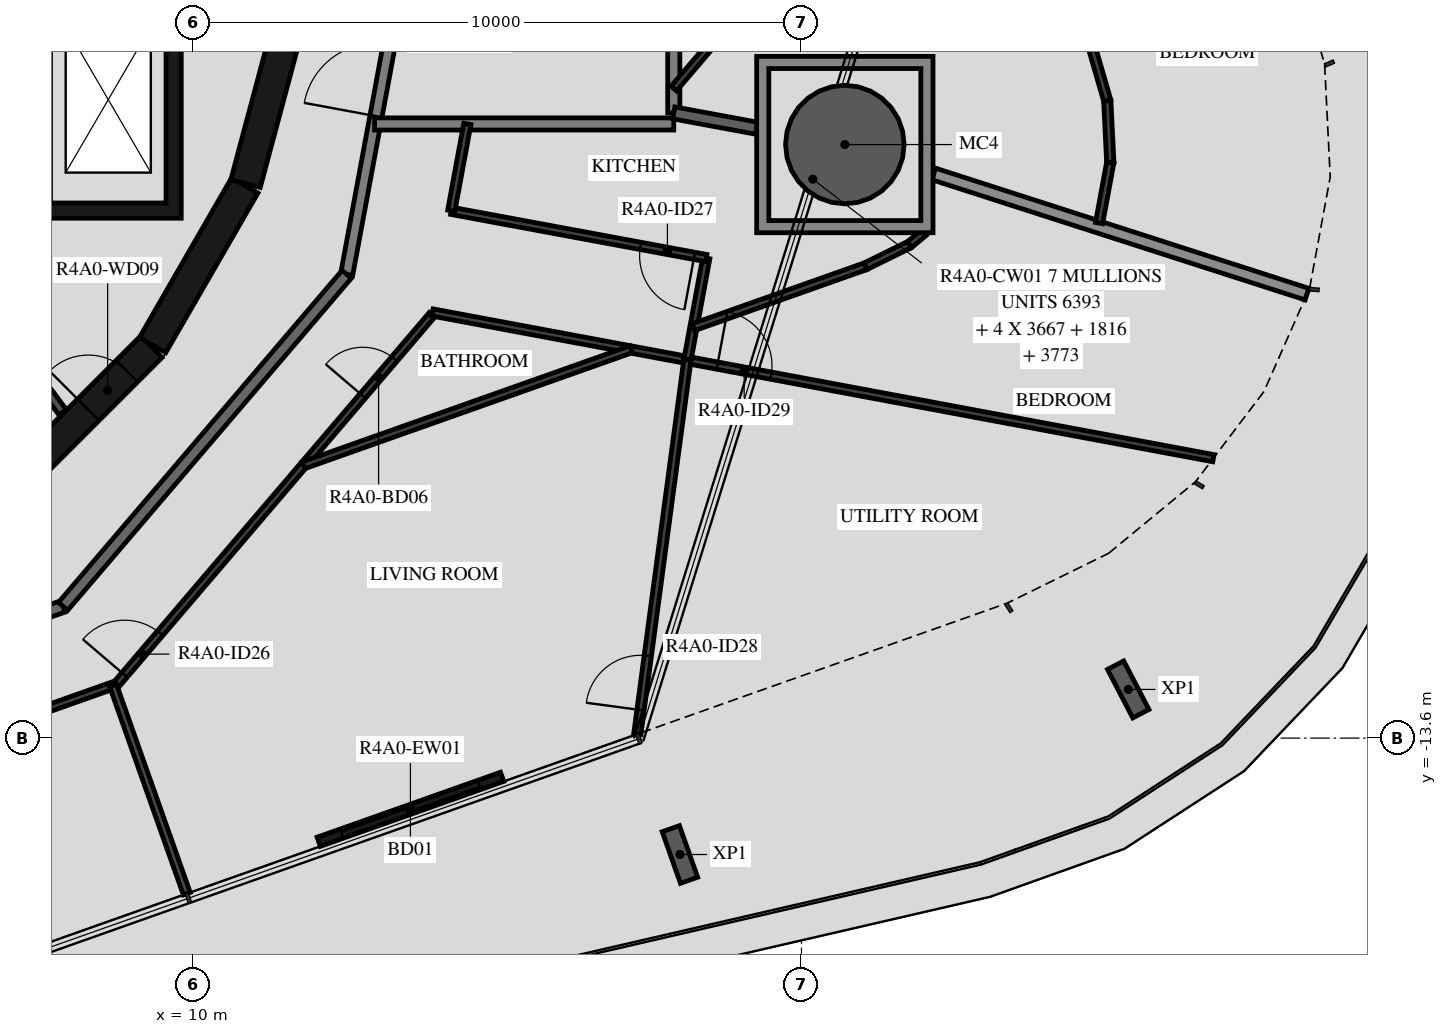
"""IFC4 building model, lengths in metres.
Left out: names, types, materials, properties, quantities, classifications, styles, units other than length and angle.
Written with IfcOpenShell. Run it as: python <this file> out.ifc"""

import sys

from ifc_helpers import new_model, si_unit, direction, frame, frame_2d, origin, origin_2d, place, context, subcontext, project, spatial, polyline, rectangle, hollow_circle, i_section, outline, extrude, element, fill, save


model = new_model("IFC4")
c1 = context("Model", 3, precision=1e-05, world=origin(), true_north=direction((0.0, 1.0)))
c2 = subcontext(c1, "Body", "Model", "MODEL_VIEW")
j1 = project(units=[si_unit("LENGTHUNIT", "METRE"), si_unit("PLANEANGLEUNIT", "RADIAN")], contexts=[c1])
p1 = place(None, origin())
s1 = spatial("IfcSite", under=j1, at=p1, CompositionType="ELEMENT")
p2 = place(p1, origin())
s2 = spatial("IfcBuilding", under=s1, at=p2, CompositionType="ELEMENT")
p3 = place(p2, frame((0.0, 0.0, 151.7)))
s3 = spatial("IfcBuildingStorey", under=s2, at=p3, CompositionType="ELEMENT", Elevation=151.7)
p4 = place(p3, frame((20.713, -3.839, -0.45), z_axis=(0.0, 0.0, 1.0), x_axis=(1.0, 0.0, 0.0)))
e1 = element("IfcColumn", 1, at=p4, inside=s3, PredefinedType="COLUMN", context=c2, shape_type="SweptSolid", body=[
    extrude(hollow_circle(Radius=0.975, WallThickness=0.045, at=origin_2d()), origin(), (0.0, 0.0, 1.0), 3.57),
])
for number, where, z_axis, x_axis in (
    (2, (18.001, -15.514, -0.45), (0.0, 0.0, 1.0), (-0.943, -0.334, 0.0)),
    (3, (25.374, -12.799, -0.45), (0.0, 0.0, 1.0), (-0.887, -0.461, 0.0)),
):
    element("IfcColumn", number, at=place(p3, frame(where, z_axis=z_axis, x_axis=x_axis)), inside=s3, PredefinedType="COLUMN", context=c2, shape_type="SweptSolid", body=[
        extrude(i_section(OverallWidth=0.3, OverallDepth=0.9, WebThickness=0.019, FlangeThickness=0.035, FilletRadius=0.03, at=origin_2d()), origin(), (0.0, 0.0, 1.0), 3.57),
    ])
p5 = place(p3, frame((12.061, -15.305, 0.0), z_axis=(0.0, 0.0, 1.0), x_axis=(0.942620722428, 0.333865502335, 0.0)))
e4 = element("IfcWall", 4, at=p5, inside=s3, PredefinedType="STANDARD", context=c2, shape_type="SweptSolid", body=[
    extrude(rectangle(XDim=3.2, YDim=0.16, at=frame_2d((1.6, 0.0))), origin(), (0.0, 0.0, 1.0), 3.12),
])
p6 = place(p5, frame((0.4, 0.0, 0.0)))
e5 = element("IfcOpeningElement", 5, at=p6, cuts=e4, PredefinedType="OPENING", context=c2, shape_type="SweptSolid", body=[
    extrude(rectangle(XDim=2.4, YDim=2.4, at=frame_2d((1.2, 1.2))), frame((0.0, 0.09, 0.0), z_axis=(0.0, -1.0, 0.0), x_axis=(1.0, 0.0, 0.0)), (0.0, 0.0, 1.0), 0.18),
])
p7 = place(p3, frame((7.164, -9.308, 0.0), z_axis=(0.0, 0.0, 1.0), x_axis=(0.707106781187, 0.707106781187, 0.0)))
e6 = element("IfcWall", 6, at=p7, inside=s3, PredefinedType="SHEAR", context=c2, shape_type="SweptSolid", body=[
    extrude(rectangle(XDim=3.032, YDim=0.5, at=frame_2d((1.516, 0.0))), origin(), (0.0, 0.0, 1.0), 3.12),
])
p8 = place(p7, frame((1.566, 0.0, 0.0)))
e7 = element("IfcOpeningElement", 7, at=p8, cuts=e6, PredefinedType="OPENING", context=c2, shape_type="SweptSolid", body=[
    extrude(rectangle(XDim=0.9, YDim=2.1, at=frame_2d((0.45, 1.05))), frame((0.0, 0.26, 0.0), z_axis=(0.0, -1.0, 0.0), x_axis=(1.0, 0.0, 0.0)), (0.0, 0.0, 1.0), 0.52),
])
for number, where, z_axis, x_axis in (
    (8, (9.329, -7.137, 0.0), (0.0, 0.0, 1.0), (0.5, 0.866, 0.0)),
    (9, (10.858, -4.479, 0.0), (0.0, 0.0, 1.0), (0.259, 0.966, 0.0)),
):
    element("IfcWall", number, at=place(p3, frame(where, z_axis=z_axis, x_axis=x_axis)), inside=s3, PredefinedType="SHEAR", context=c2, shape_type="SweptSolid", body=[
        extrude(rectangle(XDim=3.033, YDim=0.5, at=frame_2d((1.516, 0.0))), origin(), (0.0, 0.0, 1.0), 3.12),
    ])
p9 = place(p3, origin())
e10 = element("IfcWall", 10, at=p9, inside=s3, PredefinedType="SHEAR", context=c2, shape_type="SweptSolid", body=[
    extrude(outline(polyline([(9.8, -5.05), (9.8, -4.8), (9.8, -1.9), (9.55, -1.9), (9.55, -4.8), (7.65, -4.8), (7.65, -1.9), (7.4, -1.9), (7.4, -4.8), (5.5, -4.8), (5.5, -1.9), (5.25, -1.9), (5.25, -4.8), (3.35, -4.8), (3.35, -1.9), (3.1, -1.9), (3.1, -4.8), (1.2, -4.8), (1.2, -1.9), (0.95, -1.9), (0.95, -4.8), (-0.95, -4.8), (-0.95, -1.9), (-1.2, -1.9), (-1.2, -4.8), (-3.1, -4.8), (-3.1, -1.9), (-3.35, -1.9), (-3.35, -4.8), (-5.25, -4.8), (-5.25, -1.9), (-5.5, -1.9), (-5.5, -4.8), (-7.4, -4.8), (-7.4, -1.9), (-7.65, -1.9), (-7.65, -4.8), (-9.55, -4.8), (-9.55, -1.9), (-9.8, -1.9), (-9.8, -4.8), (-9.8, -5.05), (9.8, -5.05)])), origin(), (0.0, 0.0, 1.0), 3.12),
])
p10 = place(p3, frame((5.528, -5.098, 0.0), z_axis=(0.0, 0.0, 1.0), x_axis=(0.594034318069, -0.804439698769, 0.0)))
e11 = element("IfcWall", 11, at=p10, inside=s3, PredefinedType="PARTITIONING", context=c2, shape_type="SweptSolid", body=[
    extrude(rectangle(XDim=3.907, YDim=0.15, at=frame_2d((1.953, 0.0))), origin(), (0.0, 0.0, 1.0), 3.12),
])
p11 = place(p3, frame((12.521, -5.972, 0.0), z_axis=(0.0, 0.0, 1.0), x_axis=(0.182244189886, 0.983253301674, 0.0)))
e12 = element("IfcWall", 12, at=p11, inside=s3, PredefinedType="STANDARD", context=c2, shape_type="SweptSolid", body=[
    extrude(rectangle(XDim=4.176, YDim=0.2, at=frame_2d((2.088, 0.0))), origin(), (0.0, 0.0, 1.0), 3.12),
])
p12 = place(p11, frame((2.645, 0.0, 0.0)))
e13 = element("IfcOpeningElement", 13, at=p12, cuts=e12, PredefinedType="OPENING", context=c2, shape_type="SweptSolid", body=[
    extrude(rectangle(XDim=1.2, YDim=2.1, at=frame_2d((0.6, 1.05))), frame((0.0, 0.11, 0.0), z_axis=(0.0, -1.0, 0.0), x_axis=(1.0, 0.0, 0.0)), (0.0, 0.0, 1.0), 0.22),
])
p13 = place(p3, frame((1.088, -13.83, 0.0), z_axis=(0.0, 0.0, 1.0), x_axis=(0.942648397945, 0.333787354241, 0.0)))
e14 = element("IfcWall", 14, at=p13, inside=s3, PredefinedType="STANDARD", context=c2, shape_type="SweptSolid", body=[
    extrude(rectangle(XDim=7.181, YDim=0.2, at=frame_2d((3.591, 0.0))), origin(), (0.0, 0.0, 1.0), 3.12),
])
p14 = place(p13, frame((0.2, 0.0, 0.0)))
e15 = element("IfcOpeningElement", 15, at=p14, cuts=e14, PredefinedType="OPENING", context=c2, shape_type="SweptSolid", body=[
    extrude(rectangle(XDim=1.0, YDim=2.1, at=frame_2d((0.5, 1.05))), frame((0.0, 0.11, 0.0), z_axis=(0.0, -1.0, 0.0), x_axis=(1.0, 0.0, 0.0)), (0.0, 0.0, 1.0), 0.22),
])
p15 = place(p3, frame((7.858, -11.433, 0.0), z_axis=(0.0, 0.0, 1.0), x_axis=(0.649440801937, 0.760412154545, 0.0)))
e16 = element("IfcWall", 16, at=p15, inside=s3, PredefinedType="STANDARD", context=c2, shape_type="SweptSolid", body=[
    extrude(rectangle(XDim=7.181, YDim=0.2, at=frame_2d((3.59, 0.0))), origin(), (0.0, 0.0, 1.0), 3.12),
])
p16 = place(p3, frame((17.9, -3.318, 0.0), z_axis=(0.0, 0.0, 1.0), x_axis=(0.0, 1.0, 0.0)))
e17 = element("IfcWall", 17, at=p16, inside=s3, PredefinedType="STANDARD", context=c2, shape_type="SweptSolid", body=[
    extrude(rectangle(XDim=6.818, YDim=0.2, at=frame_2d((3.409, 0.0))), origin(), (0.0, 0.0, 1.0), 3.12),
])
p17 = place(p3, frame((12.979, -3.5, 0.0), z_axis=(0.0, 0.0, 1.0), x_axis=(1.0, 0.0, 0.0)))
e18 = element("IfcWall", 18, at=p17, inside=s3, PredefinedType="STANDARD", context=c2, shape_type="SweptSolid", body=[
    extrude(rectangle(XDim=4.92, YDim=0.2, at=frame_2d((2.46, 0.0))), origin(), (0.0, 0.0, 1.0), 3.12),
])
p18 = place(p3, frame((22.173, -4.322, 0.0), z_axis=(0.0, 0.0, 1.0), x_axis=(0.951906405572, -0.306388960362, 0.0)))
e19 = element("IfcWall", 19, at=p18, inside=s3, PredefinedType="STANDARD", context=c2, shape_type="SweptSolid", body=[
    extrude(rectangle(XDim=6.45, YDim=0.2, at=frame_2d((3.225, 0.0))), origin(), (0.0, 0.0, 1.0), 2.73),
])
p19 = place(p3, frame((17.9, -3.318, 0.0), z_axis=(0.0, 0.0, 1.0), x_axis=(0.983252800712, -0.182246892682, 0.0)))
e20 = element("IfcWall", 20, at=p19, inside=s3, PredefinedType="STANDARD", context=c2, shape_type="SweptSolid", body=[
    extrude(rectangle(XDim=1.386, YDim=0.2, at=frame_2d((0.693, 0.0))), origin(), (0.0, 0.0, 1.0), 3.12),
])
p20 = place(p3, frame((17.9, -2.918, 0.0), z_axis=(0.0, 0.0, 1.0), x_axis=(0.649469887983, 0.760387312232, 0.0)))
e21 = element("IfcWall", 21, at=p20, inside=s3, PredefinedType="PARTITIONING", context=c2, shape_type="SweptSolid", body=[
    extrude(rectangle(XDim=5.527, YDim=0.12, at=frame_2d((2.763, 0.0))), origin(), (0.0, 0.0, 1.0), 3.12),
])
p21 = place(p20, frame((1.7, 0.0, 0.0)))
e22 = element("IfcOpeningElement", 22, at=p21, cuts=e21, PredefinedType="OPENING", context=c2, shape_type="SweptSolid", body=[
    extrude(rectangle(XDim=0.9, YDim=2.1, at=frame_2d((0.45, 1.05))), frame((0.0, 0.07, 0.0), z_axis=(0.0, -1.0, 0.0), x_axis=(1.0, 0.0, 0.0)), (0.0, 0.0, 1.0), 0.14),
])
for number, where, z_axis, x_axis in (
    (23, (24.894, -5.131, 0.0), (0.0, 0.0, 1.0), (0.182, 0.983, 0.0)),
    (24, (25.079, -4.132, 0.0), (0.0, 0.0, 1.0), (-0.049, 0.999, 0.0)),
):
    element("IfcWall", number, at=place(p3, frame(where, z_axis=z_axis, x_axis=x_axis)), inside=s3, PredefinedType="PARTITIONING", context=c2, shape_type="SweptSolid", body=[
        extrude(rectangle(XDim=1.016, YDim=0.12, at=frame_2d((0.508, 0.0))), origin(), (0.0, 0.0, 1.0), 3.12),
    ])
p22 = place(p3, frame((25.029, -3.117, 0.0), z_axis=(0.0, 0.0, 1.0), x_axis=(-0.278559922069, 0.96041885124, 0.0)))
e25 = element("IfcWall", 25, at=p22, inside=s3, PredefinedType="PARTITIONING", context=c2, shape_type="SweptSolid", body=[
    extrude(rectangle(XDim=1.016, YDim=0.12, at=frame_2d((0.508, 0.0))), origin(), (0.0, 0.0, 1.0), 3.12),
])
p23 = place(p3, frame((1.269, -15.357, 0.0), z_axis=(0.0, 0.0, 1.0), x_axis=(0.942639442898, 0.333812643101, 0.0)))
e26 = element("IfcWall", 26, at=p23, inside=s3, PredefinedType="PARTITIONING", context=c2, shape_type="SweptSolid", body=[
    extrude(rectangle(XDim=7.86, YDim=0.12, at=frame_2d((3.93, 0.0))), origin(), (0.0, 0.0, 1.0), 3.12),
])
p24 = place(p23, frame((0.2, 0.0, 0.0)))
e27 = element("IfcOpeningElement", 27, at=p24, cuts=e26, PredefinedType="OPENING", context=c2, shape_type="SweptSolid", body=[
    extrude(rectangle(XDim=0.9, YDim=2.1, at=frame_2d((0.45, 1.05))), frame((0.0, 0.07, 0.0), z_axis=(0.0, -1.0, 0.0), x_axis=(1.0, 0.0, 0.0)), (0.0, 0.0, 1.0), 0.14),
])
p25 = place(p3, frame((8.737, -12.713, 0.0), z_axis=(0.0, 0.0, 1.0), x_axis=(0.649430604754, 0.760420863476, 0.0)))
e28 = element("IfcWall", 28, at=p25, inside=s3, PredefinedType="PARTITIONING", context=c2, shape_type="SweptSolid", body=[
    extrude(rectangle(XDim=7.985, YDim=0.12, at=frame_2d((3.992, 0.0))), origin(), (0.0, 0.0, 1.0), 3.12),
])
p26 = place(p25, frame((0.2, 0.0, 0.0)))
e29 = element("IfcOpeningElement", 29, at=p26, cuts=e28, PredefinedType="OPENING", context=c2, shape_type="SweptSolid", body=[
    extrude(rectangle(XDim=0.9, YDim=2.1, at=frame_2d((0.45, 1.05))), frame((0.0, 0.07, 0.0), z_axis=(0.0, -1.0, 0.0), x_axis=(1.0, 0.0, 0.0)), (0.0, 0.0, 1.0), 0.14),
])
p27 = place(p25, frame((6.234, 0.0, 0.0)))
e30 = element("IfcOpeningElement", 30, at=p27, cuts=e28, PredefinedType="OPENING", context=c2, shape_type="SweptSolid", body=[
    extrude(rectangle(XDim=0.8, YDim=2.1, at=frame_2d((0.4, 1.05))), frame((0.0, 0.07, 0.0), z_axis=(0.0, -1.0, 0.0), x_axis=(1.0, 0.0, 0.0)), (0.0, 0.0, 1.0), 0.14),
])
p28 = place(p3, frame((13.93, -6.6, 0.0), z_axis=(0.0, 0.0, 1.0), x_axis=(0.983034896283, -0.183418626887, 0.0)))
e31 = element("IfcWall", 31, at=p28, inside=s3, PredefinedType="PARTITIONING", context=c2, shape_type="SweptSolid", body=[
    extrude(rectangle(XDim=13.066, YDim=0.12, at=frame_2d((6.533, 0.0))), origin(), (0.0, 0.0, 1.0), 3.12),
])
p29 = place(p28, frame((4.766, 0.0, 0.0)))
e32 = element("IfcOpeningElement", 32, at=p29, cuts=e31, PredefinedType="OPENING", context=c2, shape_type="SweptSolid", body=[
    extrude(rectangle(XDim=0.9, YDim=2.1, at=frame_2d((0.45, 1.05))), frame((0.0, 0.07, 0.0), z_axis=(0.0, -1.0, 0.0), x_axis=(1.0, 0.0, 0.0)), (0.0, 0.0, 1.0), 0.14),
])
p30 = place(p3, frame((18.125, -7.377, 0.0), z_axis=(0.0, 0.0, 1.0), x_axis=(0.182233242958, 0.983255330604, 0.0)))
e33 = element("IfcWall", 33, at=p30, inside=s3, PredefinedType="PARTITIONING", context=c2, shape_type="SweptSolid", body=[
    extrude(rectangle(XDim=1.7, YDim=0.12, at=frame_2d((0.85, 0.0))), origin(), (0.0, 0.0, 1.0), 3.12),
])
p31 = place(p3, frame((18.435, -5.706, 0.0), z_axis=(0.0, 0.0, 1.0), x_axis=(-0.983256187302, 0.18222862051, 0.0)))
e34 = element("IfcWall", 34, at=p31, inside=s3, PredefinedType="PARTITIONING", context=c2, shape_type="SweptSolid", body=[
    extrude(rectangle(XDim=4.266, YDim=0.12, at=frame_2d((2.133, 0.0))), origin(), (0.0, 0.0, 1.0), 3.12),
])
p32 = place(p31, frame((0.2, 0.0, 0.0)))
e35 = element("IfcOpeningElement", 35, at=p32, cuts=e34, PredefinedType="OPENING", context=c2, shape_type="SweptSolid", body=[
    extrude(rectangle(XDim=0.9, YDim=2.1, at=frame_2d((0.45, 1.05))), frame((0.0, 0.07, 0.0), z_axis=(0.0, -1.0, 0.0), x_axis=(1.0, 0.0, 0.0)), (0.0, 0.0, 1.0), 0.14),
])
p33 = place(p3, frame((14.24, -4.928, 0.0), z_axis=(0.0, 0.0, 1.0), x_axis=(0.182329957282, 0.983237400976, 0.0)))
e36 = element("IfcWall", 36, at=p33, inside=s3, PredefinedType="PARTITIONING", context=c2, shape_type="SweptSolid", body=[
    extrude(rectangle(XDim=1.453, YDim=0.12, at=frame_2d((0.727, 0.0))), origin(), (0.0, 0.0, 1.0), 3.12),
])
p34 = place(p3, frame((9.891, -16.158, 0.0), z_axis=(0.0, 0.0, 1.0), x_axis=(-0.33385336213, 0.942625022262, 0.0)))
e37 = element("IfcWall", 37, at=p34, inside=s3, PredefinedType="PARTITIONING", context=c2, shape_type="SweptSolid", body=[
    extrude(rectangle(XDim=3.633, YDim=0.12, at=frame_2d((1.816, 0.0))), origin(), (0.0, 0.0, 1.0), 2.73),
])
p35 = place(p3, frame((17.198, -7.206, 0.0), z_axis=(0.0, 0.0, 1.0), x_axis=(-0.942639551003, -0.333812337826, 0.0)))
e38 = element("IfcWall", 38, at=p35, inside=s3, PredefinedType="PARTITIONING", context=c2, shape_type="SweptSolid", body=[
    extrude(rectangle(XDim=5.713, YDim=0.12, at=frame_2d((2.857, 0.0))), origin(), (0.0, 0.0, 1.0), 3.12),
])
p36 = place(p3, frame((17.3, -13.534, 0.0), z_axis=(0.0, 0.0, 1.0), x_axis=(0.132727504799, 0.991152566192, 0.0)))
e39 = element("IfcWall", 39, at=p36, inside=s3, PredefinedType="PARTITIONING", context=c2, shape_type="SweptSolid", body=[
    extrude(rectangle(XDim=6.212, YDim=0.12, at=frame_2d((3.106, 0.0))), origin(), (0.0, 0.0, 1.0), 3.12),
])
p37 = place(p36, frame((0.4, 0.0, 0.0)))
e40 = element("IfcOpeningElement", 40, at=p37, cuts=e39, PredefinedType="OPENING", context=c2, shape_type="SweptSolid", body=[
    extrude(rectangle(XDim=0.9, YDim=2.1, at=frame_2d((0.45, 1.05))), frame((0.0, 0.07, 0.0), z_axis=(0.0, -1.0, 0.0), x_axis=(1.0, 0.0, 0.0)), (0.0, 0.0, 1.0), 0.14),
])
p38 = place(p3, frame((22.013, -5.289, 0.0), z_axis=(0.0, 0.0, 1.0), x_axis=(-0.771907381926, -0.635735002755, 0.0)))
e41 = element("IfcWall", 41, at=p38, inside=s3, PredefinedType="PARTITIONING", context=c2, shape_type="SweptSolid", body=[
    extrude(rectangle(XDim=0.308, YDim=0.12, at=frame_2d((0.154, 0.0))), origin(), (0.0, 0.0, 1.0), 3.12),
])
p39 = place(p3, frame((21.775, -5.485, 0.0), z_axis=(0.0, 0.0, 1.0), x_axis=(-0.897493373385, -0.441027940986, 0.0)))
e42 = element("IfcWall", 42, at=p39, inside=s3, PredefinedType="PARTITIONING", context=c2, shape_type="SweptSolid", body=[
    extrude(rectangle(XDim=0.807, YDim=0.12, at=frame_2d((0.403, 0.0))), origin(), (0.0, 0.0, 1.0), 3.12),
])
p40 = place(p3, frame((21.052, -5.841, 0.0), z_axis=(0.0, 0.0, 1.0), x_axis=(-0.94262615799, -0.33385015542, 0.0)))
e43 = element("IfcWall", 43, at=p40, inside=s3, PredefinedType="PARTITIONING", context=c2, shape_type="SweptSolid", body=[
    extrude(rectangle(XDim=3.0, YDim=0.12, at=frame_2d((1.5, 0.0))), origin(), (0.0, 0.0, 1.0), 3.12),
])
p41 = place(p3, origin())
e44 = element("IfcWall", 44, at=p41, inside=s3, PredefinedType="STANDARD", context=c2, shape_type="SweptSolid", body=[
    extrude(outline(polyline([(22.163, -2.389), (22.163, -5.289), (19.263, -5.289), (19.263, -2.389), (22.163, -2.389)]), holes=[polyline([(19.463, -5.089), (21.963, -5.089), (21.963, -2.589), (19.463, -2.589), (19.463, -5.089)])]), origin(), (0.0, 0.0, 1.0), 3.12),
])
p42 = place(p6, origin())
e45 = element("IfcDoor", 45, at=p42, inside=s3, OperationType="DOUBLE_DOOR_SLIDING", PredefinedType="DOOR", context=c2, shape_type="SweptSolid", body=[
    extrude(rectangle(XDim=2.4, YDim=2.4, at=frame_2d((1.2, 1.2))), frame((0.0, 0.025, 0.0), z_axis=(0.0, -1.0, 0.0), x_axis=(1.0, 0.0, 0.0)), (0.0, 0.0, 1.0), 0.05),
])
fill(e5, e45)
p43 = place(p8, origin())
e46 = element("IfcDoor", 46, at=p43, inside=s3, OperationType="SINGLE_SWING_LEFT", PredefinedType="DOOR", context=c2, shape_type="SweptSolid", body=[
    extrude(rectangle(XDim=0.9, YDim=2.1, at=frame_2d((0.45, 1.05))), frame((0.0, 0.025, 0.0), z_axis=(0.0, -1.0, 0.0), x_axis=(1.0, 0.0, 0.0)), (0.0, 0.0, 1.0), 0.05),
])
fill(e7, e46)
p44 = place(p26, origin())
e47 = element("IfcDoor", 47, at=p44, inside=s3, OperationType="SINGLE_SWING_RIGHT", PredefinedType="DOOR", context=c2, shape_type="SweptSolid", body=[
    extrude(rectangle(XDim=0.9, YDim=2.1, at=frame_2d((0.45, 1.05))), frame((0.0, 0.025, 0.0), z_axis=(0.0, -1.0, 0.0), x_axis=(1.0, 0.0, 0.0)), (0.0, 0.0, 1.0), 0.05),
])
fill(e29, e47)
p45 = place(p27, origin())
e48 = element("IfcDoor", 48, at=p45, inside=s3, OperationType="SINGLE_SWING_RIGHT", PredefinedType="DOOR", context=c2, shape_type="SweptSolid", body=[
    extrude(rectangle(XDim=0.8, YDim=2.1, at=frame_2d((0.4, 1.05))), frame((0.0, 0.025, 0.0), z_axis=(0.0, -1.0, 0.0), x_axis=(1.0, 0.0, 0.0)), (0.0, 0.0, 1.0), 0.05),
])
fill(e30, e48)
p46 = place(p32, origin())
e49 = element("IfcDoor", 49, at=p46, inside=s3, OperationType="SINGLE_SWING_LEFT", PredefinedType="DOOR", context=c2, shape_type="SweptSolid", body=[
    extrude(rectangle(XDim=0.9, YDim=2.1, at=frame_2d((0.45, 1.05))), frame((0.0, 0.025, 0.0), z_axis=(0.0, -1.0, 0.0), x_axis=(1.0, 0.0, 0.0)), (0.0, 0.0, 1.0), 0.05),
])
fill(e35, e49)
p47 = place(p37, origin())
e50 = element("IfcDoor", 50, at=p47, inside=s3, OperationType="SINGLE_SWING_RIGHT", PredefinedType="DOOR", context=c2, shape_type="SweptSolid", body=[
    extrude(rectangle(XDim=0.9, YDim=2.1, at=frame_2d((0.45, 1.05))), frame((0.0, 0.025, 0.0), z_axis=(0.0, -1.0, 0.0), x_axis=(1.0, 0.0, 0.0)), (0.0, 0.0, 1.0), 0.05),
])
fill(e40, e50)
p48 = place(p29, origin())
e51 = element("IfcDoor", 51, at=p48, inside=s3, OperationType="SINGLE_SWING_RIGHT", PredefinedType="DOOR", context=c2, shape_type="SweptSolid", body=[
    extrude(rectangle(XDim=0.9, YDim=2.1, at=frame_2d((0.45, 1.05))), frame((0.0, 0.025, 0.0), z_axis=(0.0, -1.0, 0.0), x_axis=(1.0, 0.0, 0.0)), (0.0, 0.0, 1.0), 0.05),
])
fill(e32, e51)
p49 = place(p12, origin())
e52 = element("IfcDoor", 52, at=p49, inside=s3, OperationType="DOUBLE_DOOR_SINGLE_SWING", PredefinedType="DOOR", context=c2, shape_type="SweptSolid", body=[
    extrude(rectangle(XDim=1.2, YDim=2.1, at=frame_2d((0.6, 1.05))), frame((0.0, 0.025, 0.0), z_axis=(0.0, -1.0, 0.0), x_axis=(1.0, 0.0, 0.0)), (0.0, 0.0, 1.0), 0.05),
])
fill(e13, e52)
save(model, sys.argv[1])
